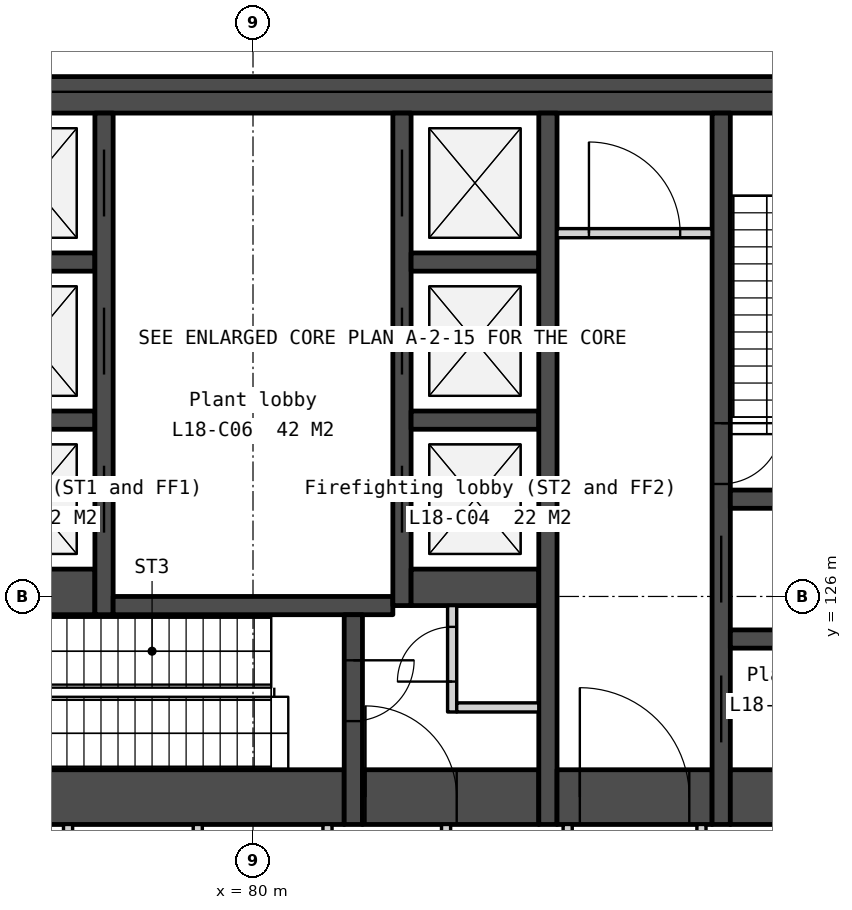
"""IFC4 building model, lengths in metres.
Left out: names, types, materials, properties, quantities, classifications, styles, units other than length and angle.
Written with IfcOpenShell. Run it as: python <this file> out.ifc"""

import sys

from ifc_helpers import new_model, si_unit, direction, frame, frame_2d, origin, place, context, subcontext, project, spatial, rectangle, extrude, element, fill, save


model = new_model("IFC4")
c1 = context("Model", 3, precision=1e-05, world=origin(), true_north=direction((0.0, 1.0)))
c2 = subcontext(c1, "Body", "Model", "MODEL_VIEW")
j1 = project(units=[si_unit("LENGTHUNIT", "METRE"), si_unit("PLANEANGLEUNIT", "RADIAN")], contexts=[c1])
p1 = place(None, origin())
s1 = spatial("IfcSite", under=j1, at=p1, CompositionType="ELEMENT")
p2 = place(p1, origin())
s2 = spatial("IfcBuilding", under=s1, at=p2, CompositionType="ELEMENT")
p3 = place(p2, frame((0.0, 0.0, 77.0)))
s3 = spatial("IfcBuildingStorey", under=s2, at=p3, CompositionType="ELEMENT", Elevation=77.0)
p4 = place(p3, frame((66.0, 134.25, 0.0), z_axis=(0.0, 0.0, 1.0), x_axis=(1.0, 0.0, 0.0)))
e1 = element("IfcWall", 1, at=p4, inside=s3, PredefinedType="SOLIDWALL", context=c2, shape_type="SweptSolid", body=[
    extrude(rectangle(XDim=28.0, YDim=0.6, at=frame_2d((14.0, 0.0))), origin(), (0.0, 0.0, 1.0), 4.35),
])
for number, where, z_axis, x_axis in (
    (2, (75.3, 131.5, 0.0), (0.0, 0.0, 1.0), (1.0, 0.0, 0.0)),
    (3, (75.3, 128.9, 0.0), (0.0, 0.0, 1.0), (1.0, 0.0, 0.0)),
):
    element("IfcWall", number, at=place(p3, frame(where, z_axis=z_axis, x_axis=x_axis)), inside=s3, PredefinedType="SOLIDWALL", context=c2, shape_type="SweptSolid", body=[
        extrude(rectangle(XDim=2.1, YDim=0.3, at=frame_2d((1.05, 0.0))), origin(), (0.0, 0.0, 1.0), 4.35),
    ])
p5 = place(p3, frame((75.3, 126.075, 0.0), z_axis=(0.0, 0.0, 1.0), x_axis=(1.0, 0.0, 0.0)))
e4 = element("IfcWall", 4, at=p5, inside=s3, PredefinedType="SOLIDWALL", context=c2, shape_type="SweptSolid", body=[
    extrude(rectangle(XDim=2.1, YDim=0.75, at=frame_2d((1.05, 0.0))), origin(), (0.0, 0.0, 1.0), 4.35),
])
p6 = place(p3, frame((75.3, 122.7, 0.0), z_axis=(0.0, 0.0, 1.0), x_axis=(1.0, 0.0, 0.0)))
e5 = element("IfcWall", 5, at=p6, inside=s3, PredefinedType="SOLIDWALL", context=c2, shape_type="SweptSolid", body=[
    extrude(rectangle(XDim=6.2, YDim=0.9, at=frame_2d((3.1, 0.0))), origin(), (0.0, 0.0, 1.0), 4.35),
])
p7 = place(p3, frame((76.958, 122.25, 0.0), z_axis=(0.0, 0.0, 1.0), x_axis=(0.0, -1.0, 0.0)))
e6 = element("IfcWall", 6, at=p7, inside=s3, PredefinedType="PARTITIONING", context=c2, shape_type="SweptSolid", body=[
    extrude(rectangle(XDim=2.1, YDim=0.15, at=frame_2d((1.05, 0.0))), origin(), (0.0, 0.0, 1.0), 4.35),
])
p8 = place(p3, frame((77.55, 133.95, 0.0), z_axis=(0.0, 0.0, 1.0), x_axis=(0.0, -1.0, 0.0)))
e7 = element("IfcWall", 7, at=p8, inside=s3, PredefinedType="SOLIDWALL", context=c2, shape_type="SweptSolid", body=[
    extrude(rectangle(XDim=8.25, YDim=0.3, at=frame_2d((4.125, 0.0))), origin(), (0.0, 0.0, 1.0), 4.35),
])
p9 = place(p8, frame((0.6, 0.0, 0.0)))
e8 = element("IfcOpeningElement", 8, at=p9, cuts=e7, PredefinedType="OPENING", context=c2, shape_type="SweptSolid", body=[
    extrude(rectangle(XDim=1.1, YDim=2.1, at=frame_2d((0.55, 1.05))), frame((0.0, 0.16, 0.0), z_axis=(0.0, -1.0, 0.0), x_axis=(1.0, 0.0, 0.0)), (0.0, 0.0, 1.0), 0.32),
])
p10 = place(p8, frame((3.2, 0.0, 0.0)))
e9 = element("IfcOpeningElement", 9, at=p10, cuts=e7, PredefinedType="OPENING", context=c2, shape_type="SweptSolid", body=[
    extrude(rectangle(XDim=1.1, YDim=2.1, at=frame_2d((0.55, 1.05))), frame((0.0, 0.16, 0.0), z_axis=(0.0, -1.0, 0.0), x_axis=(1.0, 0.0, 0.0)), (0.0, 0.0, 1.0), 0.32),
])
p11 = place(p8, frame((5.8, 0.0, 0.0)))
e10 = element("IfcOpeningElement", 10, at=p11, cuts=e7, PredefinedType="OPENING", context=c2, shape_type="SweptSolid", body=[
    extrude(rectangle(XDim=1.1, YDim=2.1, at=frame_2d((0.55, 1.05))), frame((0.0, 0.16, 0.0), z_axis=(0.0, -1.0, 0.0), x_axis=(1.0, 0.0, 0.0)), (0.0, 0.0, 1.0), 0.32),
])
p12 = place(p3, frame((77.7, 125.85, 0.0), z_axis=(0.0, 0.0, 1.0), x_axis=(1.0, 0.0, 0.0)))
e11 = element("IfcWall", 11, at=p12, inside=s3, PredefinedType="SOLIDWALL", context=c2, shape_type="SweptSolid", body=[
    extrude(rectangle(XDim=4.6, YDim=0.3, at=frame_2d((2.3, 0.0))), origin(), (0.0, 0.0, 1.0), 4.35),
])
for number, where, z_axis, x_axis in (
    (12, (79.092, 122.25, 0.0), (0.0, 0.0, 1.0), (0.0, -1.0, 0.0)),
    (13, (81.225, 122.25, 0.0), (0.0, 0.0, 1.0), (0.0, -1.0, 0.0)),
):
    element("IfcWall", number, at=place(p3, frame(where, z_axis=z_axis, x_axis=x_axis)), inside=s3, PredefinedType="PARTITIONING", context=c2, shape_type="SweptSolid", body=[
        extrude(rectangle(XDim=2.1, YDim=0.15, at=frame_2d((1.05, 0.0))), origin(), (0.0, 0.0, 1.0), 4.35),
    ])
p13 = place(p3, frame((81.65, 125.7, 0.0), z_axis=(0.0, 0.0, 1.0), x_axis=(0.0, -1.0, 0.0)))
e14 = element("IfcWall", 14, at=p13, inside=s3, PredefinedType="SOLIDWALL", context=c2, shape_type="SweptSolid", body=[
    extrude(rectangle(XDim=3.45, YDim=0.3, at=frame_2d((1.725, 0.0))), origin(), (0.0, 0.0, 1.0), 4.35),
])
p14 = place(p13, frame((0.75, 0.0, 0.0)))
e15 = element("IfcOpeningElement", 15, at=p14, cuts=e14, PredefinedType="OPENING", context=c2, shape_type="SweptSolid", body=[
    extrude(rectangle(XDim=1.0, YDim=2.1, at=frame_2d((0.5, 1.05))), frame((0.0, 0.16, 0.0), z_axis=(0.0, -1.0, 0.0), x_axis=(1.0, 0.0, 0.0)), (0.0, 0.0, 1.0), 0.32),
])
p15 = place(p3, frame((81.8, 122.7, 0.0), z_axis=(0.0, 0.0, 1.0), x_axis=(1.0, 0.0, 0.0)))
e16 = element("IfcWall", 16, at=p15, inside=s3, PredefinedType="SOLIDWALL", context=c2, shape_type="SweptSolid", body=[
    extrude(rectangle(XDim=2.9, YDim=0.9, at=frame_2d((1.45, 0.0))), origin(), (0.0, 0.0, 1.0), 4.35),
])
p16 = place(p15, frame((0.05, 0.0, 0.0)))
e17 = element("IfcOpeningElement", 17, at=p16, cuts=e16, PredefinedType="OPENING", context=c2, shape_type="SweptSolid", body=[
    extrude(rectangle(XDim=1.5, YDim=2.1, at=frame_2d((0.75, 1.05))), frame((0.0, 0.46, 0.0), z_axis=(0.0, -1.0, 0.0), x_axis=(1.0, 0.0, 0.0)), (0.0, 0.0, 1.0), 0.92),
])
p17 = place(p3, frame((82.45, 133.95, 0.0), z_axis=(0.0, 0.0, 1.0), x_axis=(0.0, -1.0, 0.0)))
e18 = element("IfcWall", 18, at=p17, inside=s3, PredefinedType="SOLIDWALL", context=c2, shape_type="SweptSolid", body=[
    extrude(rectangle(XDim=8.1, YDim=0.3, at=frame_2d((4.05, 0.0))), origin(), (0.0, 0.0, 1.0), 4.35),
])
p18 = place(p17, frame((0.6, 0.0, 0.0)))
e19 = element("IfcOpeningElement", 19, at=p18, cuts=e18, PredefinedType="OPENING", context=c2, shape_type="SweptSolid", body=[
    extrude(rectangle(XDim=1.1, YDim=2.1, at=frame_2d((0.55, 1.05))), frame((0.0, 0.16, 0.0), z_axis=(0.0, -1.0, 0.0), x_axis=(1.0, 0.0, 0.0)), (0.0, 0.0, 1.0), 0.32),
])
p19 = place(p17, frame((3.2, 0.0, 0.0)))
e20 = element("IfcOpeningElement", 20, at=p19, cuts=e18, PredefinedType="OPENING", context=c2, shape_type="SweptSolid", body=[
    extrude(rectangle(XDim=1.1, YDim=2.1, at=frame_2d((0.55, 1.05))), frame((0.0, 0.16, 0.0), z_axis=(0.0, -1.0, 0.0), x_axis=(1.0, 0.0, 0.0)), (0.0, 0.0, 1.0), 0.32),
])
p20 = place(p17, frame((5.8, 0.0, 0.0)))
e21 = element("IfcOpeningElement", 21, at=p20, cuts=e18, PredefinedType="OPENING", context=c2, shape_type="SweptSolid", body=[
    extrude(rectangle(XDim=1.1, YDim=2.1, at=frame_2d((0.55, 1.05))), frame((0.0, 0.16, 0.0), z_axis=(0.0, -1.0, 0.0), x_axis=(1.0, 0.0, 0.0)), (0.0, 0.0, 1.0), 0.32),
])
for number, where, z_axis, x_axis in (
    (22, (82.6, 131.5, 0.0), (0.0, 0.0, 1.0), (1.0, 0.0, 0.0)),
    (23, (82.6, 128.9, 0.0), (0.0, 0.0, 1.0), (1.0, 0.0, 0.0)),
):
    element("IfcWall", number, at=place(p3, frame(where, z_axis=z_axis, x_axis=x_axis)), inside=s3, PredefinedType="SOLIDWALL", context=c2, shape_type="SweptSolid", body=[
        extrude(rectangle(XDim=2.1, YDim=0.3, at=frame_2d((1.05, 0.0))), origin(), (0.0, 0.0, 1.0), 4.35),
    ])
p21 = place(p3, frame((82.6, 126.15, 0.0), z_axis=(0.0, 0.0, 1.0), x_axis=(1.0, 0.0, 0.0)))
e24 = element("IfcWall", 24, at=p21, inside=s3, PredefinedType="SOLIDWALL", context=c2, shape_type="SweptSolid", body=[
    extrude(rectangle(XDim=2.1, YDim=0.6, at=frame_2d((1.05, 0.0))), origin(), (0.0, 0.0, 1.0), 4.35),
])
p22 = place(p3, frame((83.175, 122.25, 0.0), z_axis=(0.0, 0.0, 1.0), x_axis=(0.0, -1.0, 0.0)))
e25 = element("IfcWall", 25, at=p22, inside=s3, PredefinedType="PARTITIONING", context=c2, shape_type="SweptSolid", body=[
    extrude(rectangle(XDim=2.1, YDim=0.15, at=frame_2d((1.05, 0.0))), origin(), (0.0, 0.0, 1.0), 4.35),
])
p23 = place(p3, frame((83.275, 125.85, 0.0), z_axis=(0.0, 0.0, 1.0), x_axis=(0.0, -1.0, 0.0)))
e26 = element("IfcWall", 26, at=p23, inside=s3, PredefinedType="PARTITIONING", context=c2, shape_type="SweptSolid", body=[
    extrude(rectangle(XDim=1.75, YDim=0.15, at=frame_2d((0.875, 0.0))), origin(), (0.0, 0.0, 1.0), 4.35),
])
p24 = place(p23, frame((0.35, 0.0, 0.0)))
e27 = element("IfcOpeningElement", 27, at=p24, cuts=e26, PredefinedType="OPENING", context=c2, shape_type="SweptSolid", body=[
    extrude(rectangle(XDim=0.9, YDim=2.1, at=frame_2d((0.45, 1.05))), frame((0.0, 0.085, 0.0), z_axis=(0.0, -1.0, 0.0), x_axis=(1.0, 0.0, 0.0)), (0.0, 0.0, 1.0), 0.17),
])
p25 = place(p3, frame((83.35, 124.175, 0.0), z_axis=(0.0, 0.0, 1.0), x_axis=(1.0, 0.0, 0.0)))
e28 = element("IfcWall", 28, at=p25, inside=s3, PredefinedType="PARTITIONING", context=c2, shape_type="SweptSolid", body=[
    extrude(rectangle(XDim=1.35, YDim=0.15, at=frame_2d((0.675, 0.0))), origin(), (0.0, 0.0, 1.0), 4.35),
])
p26 = place(p3, frame((84.85, 133.95, 0.0), z_axis=(0.0, 0.0, 1.0), x_axis=(0.0, -1.0, 0.0)))
e29 = element("IfcWall", 29, at=p26, inside=s3, PredefinedType="SOLIDWALL", context=c2, shape_type="SweptSolid", body=[
    extrude(rectangle(XDim=11.7, YDim=0.3, at=frame_2d((5.85, 0.0))), origin(), (0.0, 0.0, 1.0), 4.35),
])
p27 = place(p3, frame((85.0, 131.975, 0.0), z_axis=(0.0, 0.0, 1.0), x_axis=(1.0, 0.0, 0.0)))
e30 = element("IfcWall", 30, at=p27, inside=s3, PredefinedType="PARTITIONING", context=c2, shape_type="SweptSolid", body=[
    extrude(rectangle(XDim=2.55, YDim=0.15, at=frame_2d((1.275, 0.0))), origin(), (0.0, 0.0, 1.0), 4.35),
])
p28 = place(p27, frame((0.525, 0.0, 0.0)))
e31 = element("IfcOpeningElement", 31, at=p28, cuts=e30, PredefinedType="OPENING", context=c2, shape_type="SweptSolid", body=[
    extrude(rectangle(XDim=1.5, YDim=2.1, at=frame_2d((0.75, 1.05))), frame((0.0, 0.085, 0.0), z_axis=(0.0, -1.0, 0.0), x_axis=(1.0, 0.0, 0.0)), (0.0, 0.0, 1.0), 0.17),
])
p29 = place(p3, frame((85.0, 122.7, 0.0), z_axis=(0.0, 0.0, 1.0), x_axis=(1.0, 0.0, 0.0)))
e32 = element("IfcWall", 32, at=p29, inside=s3, PredefinedType="SOLIDWALL", context=c2, shape_type="SweptSolid", body=[
    extrude(rectangle(XDim=2.55, YDim=0.9, at=frame_2d((1.275, 0.0))), origin(), (0.0, 0.0, 1.0), 4.35),
])
p30 = place(p29, frame((0.375, 0.0, 0.0)))
e33 = element("IfcOpeningElement", 33, at=p30, cuts=e32, PredefinedType="OPENING", context=c2, shape_type="SweptSolid", body=[
    extrude(rectangle(XDim=1.8, YDim=2.1, at=frame_2d((0.9, 1.05))), frame((0.0, 0.46, 0.0), z_axis=(0.0, -1.0, 0.0), x_axis=(1.0, 0.0, 0.0)), (0.0, 0.0, 1.0), 0.92),
])
p31 = place(p3, frame((85.175, 122.25, 0.0), z_axis=(0.0, 0.0, 1.0), x_axis=(0.0, -1.0, 0.0)))
e34 = element("IfcWall", 34, at=p31, inside=s3, PredefinedType="PARTITIONING", context=c2, shape_type="SweptSolid", body=[
    extrude(rectangle(XDim=2.1, YDim=0.15, at=frame_2d((1.05, 0.0))), origin(), (0.0, 0.0, 1.0), 4.35),
])
p32 = place(p31, frame((0.55, 0.0, 0.0)))
e35 = element("IfcOpeningElement", 35, at=p32, cuts=e34, PredefinedType="OPENING", context=c2, shape_type="SweptSolid", body=[
    extrude(rectangle(XDim=1.0, YDim=2.1, at=frame_2d((0.5, 1.05))), frame((0.0, 0.085, 0.0), z_axis=(0.0, -1.0, 0.0), x_axis=(1.0, 0.0, 0.0)), (0.0, 0.0, 1.0), 0.17),
])
p33 = place(p3, frame((87.375, 122.25, 0.0), z_axis=(0.0, 0.0, 1.0), x_axis=(0.0, -1.0, 0.0)))
e36 = element("IfcWall", 36, at=p33, inside=s3, PredefinedType="PARTITIONING", context=c2, shape_type="SweptSolid", body=[
    extrude(rectangle(XDim=2.1, YDim=0.15, at=frame_2d((1.05, 0.0))), origin(), (0.0, 0.0, 1.0), 4.35),
])
p34 = place(p3, frame((87.7, 133.95, 0.0), z_axis=(0.0, 0.0, 1.0), x_axis=(0.0, -1.0, 0.0)))
e37 = element("IfcWall", 37, at=p34, inside=s3, PredefinedType="SOLIDWALL", context=c2, shape_type="SweptSolid", body=[
    extrude(rectangle(XDim=11.7, YDim=0.3, at=frame_2d((5.85, 0.0))), origin(), (0.0, 0.0, 1.0), 4.35),
])
p35 = place(p34, frame((6.95, 0.0, 0.0)))
e38 = element("IfcOpeningElement", 38, at=p35, cuts=e37, PredefinedType="OPENING", context=c2, shape_type="SweptSolid", body=[
    extrude(rectangle(XDim=1.1, YDim=2.1, at=frame_2d((0.55, 1.05))), frame((0.0, 0.16, 0.0), z_axis=(0.0, -1.0, 0.0), x_axis=(1.0, 0.0, 0.0)), (0.0, 0.0, 1.0), 0.32),
])
p36 = place(p34, frame((5.1, 0.0, 0.0)))
e39 = element("IfcOpeningElement", 39, at=p36, cuts=e37, PredefinedType="OPENING", context=c2, shape_type="SweptSolid", body=[
    extrude(rectangle(XDim=1.0, YDim=2.1, at=frame_2d((0.5, 1.05))), frame((0.0, 0.16, 0.0), z_axis=(0.0, -1.0, 0.0), x_axis=(1.0, 0.0, 0.0)), (0.0, 0.0, 1.0), 0.32),
])
p37 = place(p34, frame((9.25, 0.0, 0.0)))
e40 = element("IfcOpeningElement", 40, at=p37, cuts=e37, PredefinedType="OPENING", context=c2, shape_type="SweptSolid", body=[
    extrude(rectangle(XDim=1.1, YDim=2.1, at=frame_2d((0.55, 1.05))), frame((0.0, 0.16, 0.0), z_axis=(0.0, -1.0, 0.0), x_axis=(1.0, 0.0, 0.0)), (0.0, 0.0, 1.0), 0.32),
])
for number, where, z_axis, x_axis in (
    (41, (87.85, 127.6, 0.0), (0.0, 0.0, 1.0), (1.0, 0.0, 0.0)),
    (42, (87.85, 125.3, 0.0), (0.0, 0.0, 1.0), (1.0, 0.0, 0.0)),
):
    element("IfcWall", number, at=place(p3, frame(where, z_axis=z_axis, x_axis=x_axis)), inside=s3, PredefinedType="SOLIDWALL", context=c2, shape_type="SweptSolid", body=[
        extrude(rectangle(XDim=2.55, YDim=0.3, at=frame_2d((1.275, 0.0))), origin(), (0.0, 0.0, 1.0), 4.35),
    ])
p38 = place(p3, frame((87.85, 122.7, 0.0), z_axis=(0.0, 0.0, 1.0), x_axis=(1.0, 0.0, 0.0)))
e43 = element("IfcWall", 43, at=p38, inside=s3, PredefinedType="SOLIDWALL", context=c2, shape_type="SweptSolid", body=[
    extrude(rectangle(XDim=2.55, YDim=0.9, at=frame_2d((1.275, 0.0))), origin(), (0.0, 0.0, 1.0), 4.35),
])
p39 = place(p9, origin())
e44 = element("IfcDoor", 44, at=p39, inside=s3, OperationType="SLIDING_TO_RIGHT", PredefinedType="DOOR", context=c2, shape_type="SweptSolid", body=[
    extrude(rectangle(XDim=1.1, YDim=2.1, at=frame_2d((0.55, 1.05))), frame((0.0, 0.025, 0.0), z_axis=(0.0, -1.0, 0.0), x_axis=(1.0, 0.0, 0.0)), (0.0, 0.0, 1.0), 0.05),
])
fill(e8, e44)
p40 = place(p10, origin())
e45 = element("IfcDoor", 45, at=p40, inside=s3, OperationType="SLIDING_TO_RIGHT", PredefinedType="DOOR", context=c2, shape_type="SweptSolid", body=[
    extrude(rectangle(XDim=1.1, YDim=2.1, at=frame_2d((0.55, 1.05))), frame((0.0, 0.025, 0.0), z_axis=(0.0, -1.0, 0.0), x_axis=(1.0, 0.0, 0.0)), (0.0, 0.0, 1.0), 0.05),
])
fill(e9, e45)
p41 = place(p11, origin())
e46 = element("IfcDoor", 46, at=p41, inside=s3, OperationType="SLIDING_TO_RIGHT", PredefinedType="DOOR", context=c2, shape_type="SweptSolid", body=[
    extrude(rectangle(XDim=1.1, YDim=2.1, at=frame_2d((0.55, 1.05))), frame((0.0, 0.025, 0.0), z_axis=(0.0, -1.0, 0.0), x_axis=(1.0, 0.0, 0.0)), (0.0, 0.0, 1.0), 0.05),
])
fill(e10, e46)
p42 = place(p18, origin())
e47 = element("IfcDoor", 47, at=p42, inside=s3, OperationType="SLIDING_TO_LEFT", PredefinedType="DOOR", context=c2, shape_type="SweptSolid", body=[
    extrude(rectangle(XDim=1.1, YDim=2.1, at=frame_2d((0.55, 1.05))), frame((0.0, 0.025, 0.0), z_axis=(0.0, -1.0, 0.0), x_axis=(1.0, 0.0, 0.0)), (0.0, 0.0, 1.0), 0.05),
])
fill(e19, e47)
p43 = place(p19, origin())
e48 = element("IfcDoor", 48, at=p43, inside=s3, OperationType="SLIDING_TO_LEFT", PredefinedType="DOOR", context=c2, shape_type="SweptSolid", body=[
    extrude(rectangle(XDim=1.1, YDim=2.1, at=frame_2d((0.55, 1.05))), frame((0.0, 0.025, 0.0), z_axis=(0.0, -1.0, 0.0), x_axis=(1.0, 0.0, 0.0)), (0.0, 0.0, 1.0), 0.05),
])
fill(e20, e48)
p44 = place(p20, origin())
e49 = element("IfcDoor", 49, at=p44, inside=s3, OperationType="SLIDING_TO_LEFT", PredefinedType="DOOR", context=c2, shape_type="SweptSolid", body=[
    extrude(rectangle(XDim=1.1, YDim=2.1, at=frame_2d((0.55, 1.05))), frame((0.0, 0.025, 0.0), z_axis=(0.0, -1.0, 0.0), x_axis=(1.0, 0.0, 0.0)), (0.0, 0.0, 1.0), 0.05),
])
fill(e21, e49)
p45 = place(p35, origin())
e50 = element("IfcDoor", 50, at=p45, inside=s3, OperationType="SLIDING_TO_LEFT", PredefinedType="DOOR", context=c2, shape_type="SweptSolid", body=[
    extrude(rectangle(XDim=1.1, YDim=2.1, at=frame_2d((0.55, 1.05))), frame((0.0, 0.025, 0.0), z_axis=(0.0, -1.0, 0.0), x_axis=(1.0, 0.0, 0.0)), (0.0, 0.0, 1.0), 0.05),
])
fill(e38, e50)
p46 = place(p30, origin())
e51 = element("IfcDoor", 51, at=p46, inside=s3, OperationType="DOUBLE_DOOR_DOUBLE_SWING", PredefinedType="DOOR", context=c2, shape_type="SweptSolid", body=[
    extrude(rectangle(XDim=1.8, YDim=2.1, at=frame_2d((0.9, 1.05))), frame((0.0, 0.025, 0.0), z_axis=(0.0, -1.0, 0.0), x_axis=(1.0, 0.0, 0.0)), (0.0, 0.0, 1.0), 0.05),
])
fill(e33, e51)
p47 = place(p16, origin())
e52 = element("IfcDoor", 52, at=p47, inside=s3, OperationType="DOUBLE_DOOR_DOUBLE_SWING", PredefinedType="DOOR", context=c2, shape_type="SweptSolid", body=[
    extrude(rectangle(XDim=1.5, YDim=2.1, at=frame_2d((0.75, 1.05))), frame((0.0, 0.025, 0.0), z_axis=(0.0, -1.0, 0.0), x_axis=(1.0, 0.0, 0.0)), (0.0, 0.0, 1.0), 0.05),
])
fill(e17, e52)
p48 = place(p24, origin())
e53 = element("IfcDoor", 53, at=p48, inside=s3, OperationType="SINGLE_SWING_RIGHT", PredefinedType="DOOR", context=c2, shape_type="SweptSolid", body=[
    extrude(rectangle(XDim=0.9, YDim=2.1, at=frame_2d((0.45, 1.05))), frame((0.0, 0.025, 0.0), z_axis=(0.0, -1.0, 0.0), x_axis=(1.0, 0.0, 0.0)), (0.0, 0.0, 1.0), 0.05),
])
fill(e27, e53)
p49 = place(p28, origin())
e54 = element("IfcDoor", 54, at=p49, inside=s3, OperationType="DOUBLE_DOOR_DOUBLE_SWING", PredefinedType="DOOR", context=c2, shape_type="SweptSolid", body=[
    extrude(rectangle(XDim=1.5, YDim=2.1, at=frame_2d((0.75, 1.05))), frame((0.0, 0.025, 0.0), z_axis=(0.0, -1.0, 0.0), x_axis=(1.0, 0.0, 0.0)), (0.0, 0.0, 1.0), 0.05),
])
fill(e31, e54)
p50 = place(p36, origin())
e55 = element("IfcDoor", 55, at=p50, inside=s3, OperationType="SINGLE_SWING_LEFT", PredefinedType="DOOR", context=c2, shape_type="SweptSolid", body=[
    extrude(rectangle(XDim=1.0, YDim=2.1, at=frame_2d((0.5, 1.05))), frame((0.0, 0.025, 0.0), z_axis=(0.0, -1.0, 0.0), x_axis=(1.0, 0.0, 0.0)), (0.0, 0.0, 1.0), 0.05),
])
fill(e39, e55)
p51 = place(p14, origin())
e56 = element("IfcDoor", 56, at=p51, inside=s3, OperationType="SINGLE_SWING_LEFT", PredefinedType="DOOR", context=c2, shape_type="SweptSolid", body=[
    extrude(rectangle(XDim=1.0, YDim=2.1, at=frame_2d((0.5, 1.05))), frame((0.0, 0.025, 0.0), z_axis=(0.0, -1.0, 0.0), x_axis=(1.0, 0.0, 0.0)), (0.0, 0.0, 1.0), 0.05),
])
fill(e15, e56)
p52 = place(p37, origin())
e57 = element("IfcDoor", 57, at=p52, inside=s3, OperationType="SLIDING_TO_LEFT", PredefinedType="DOOR", context=c2, shape_type="SweptSolid", body=[
    extrude(rectangle(XDim=1.1, YDim=2.1, at=frame_2d((0.55, 1.05))), frame((0.0, 0.025, 0.0), z_axis=(0.0, -1.0, 0.0), x_axis=(1.0, 0.0, 0.0)), (0.0, 0.0, 1.0), 0.05),
])
fill(e40, e57)
save(model, sys.argv[1])
